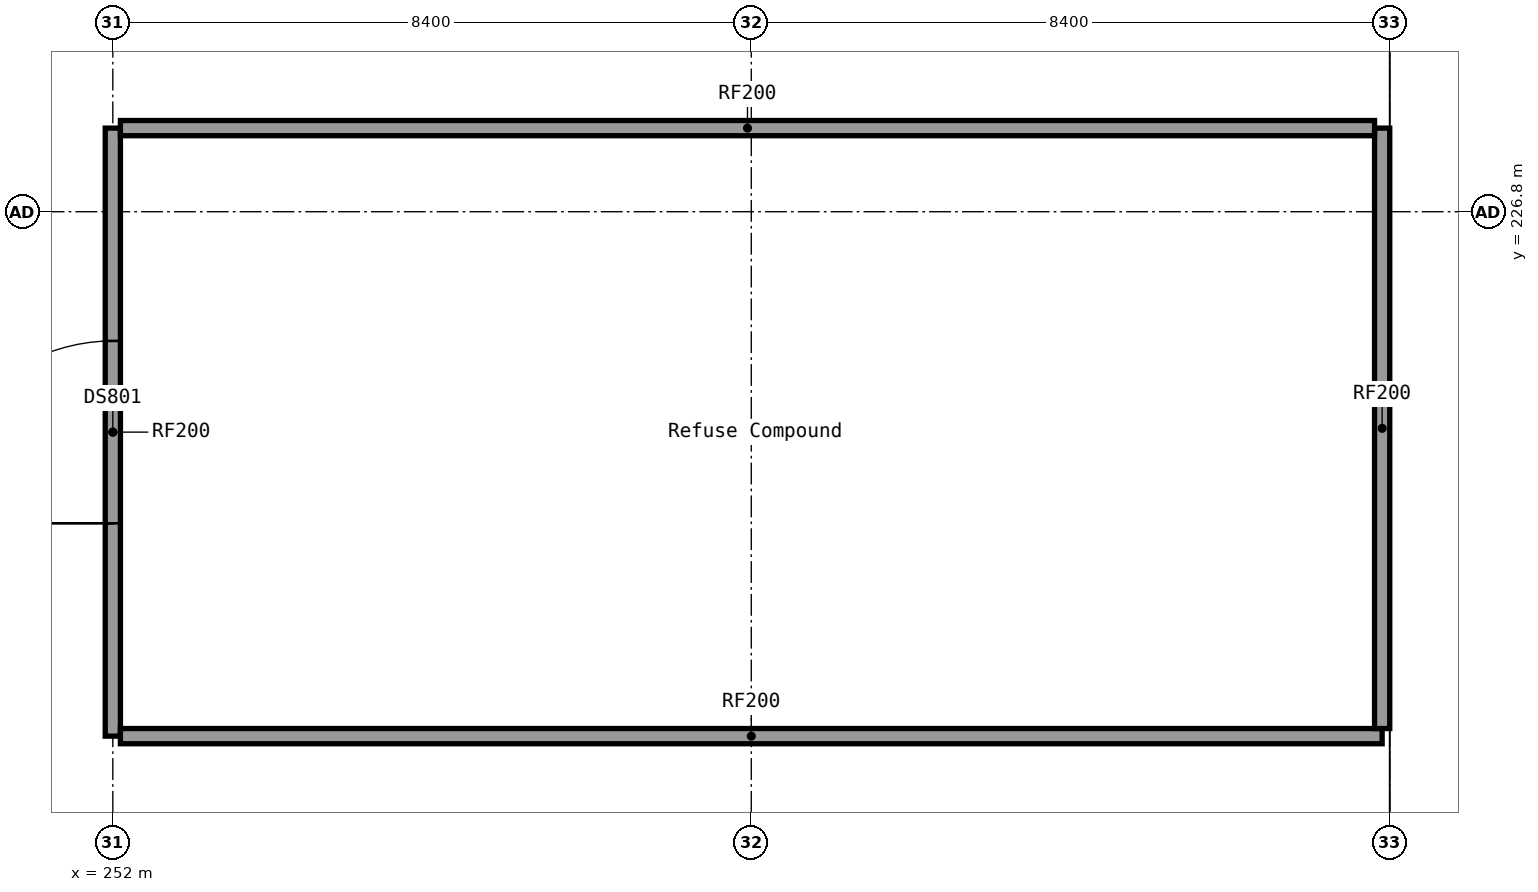
"""IFC4 building model, lengths in metres.
Left out: names, types, materials, properties, quantities, classifications, styles, units other than length and angle.
Written with IfcOpenShell. Run it as: python <this file> out.ifc"""

import sys

from ifc_helpers import new_model, si_unit, direction, frame, frame_2d, origin, place, context, subcontext, project, spatial, rectangle, extrude, element, fill, save


model = new_model("IFC4")
c1 = context("Model", 3, precision=1e-05, world=origin(), true_north=direction((0.0, 1.0)))
c2 = subcontext(c1, "Body", "Model", "MODEL_VIEW")
j1 = project(units=[si_unit("LENGTHUNIT", "METRE"), si_unit("PLANEANGLEUNIT", "RADIAN")], contexts=[c1])
p1 = place(None, origin())
s1 = spatial("IfcSite", under=j1, at=p1, CompositionType="ELEMENT")
p2 = place(p1, origin())
s2 = spatial("IfcBuilding", under=s1, at=p2, CompositionType="ELEMENT")
p3 = place(p2, origin())
s3 = spatial("IfcBuildingStorey", under=s2, at=p3, CompositionType="ELEMENT", Elevation=0.0)
p4 = place(p3, frame((252.0, 219.9, 0.0), z_axis=(0.0, 0.0, 1.0), x_axis=(0.0, 1.0, 0.0)))
e1 = element("IfcWall", 1, at=p4, inside=s3, PredefinedType="SOLIDWALL", context=c2, shape_type="SweptSolid", body=[
    extrude(rectangle(XDim=8.0, YDim=0.2, at=frame_2d((4.0, 0.0))), origin(), (0.0, 0.0, 1.0), 2.4),
])
p5 = place(p4, frame((2.8, 0.0, 0.0)))
e2 = element("IfcOpeningElement", 2, at=p5, cuts=e1, PredefinedType="OPENING", context=c2, shape_type="SweptSolid", body=[
    extrude(rectangle(XDim=2.4, YDim=2.4, at=frame_2d((1.2, 1.2))), frame((0.0, 0.1, 0.0), z_axis=(0.0, -1.0, 0.0), x_axis=(1.0, 0.0, 0.0)), (0.0, 0.0, 1.0), 0.2),
])
p6 = place(p3, frame((252.1, 219.9, 0.0), z_axis=(0.0, 0.0, 1.0), x_axis=(1.0, 0.0, 0.0)))
e3 = element("IfcWall", 3, at=p6, inside=s3, PredefinedType="SOLIDWALL", context=c2, shape_type="SweptSolid", body=[
    extrude(rectangle(XDim=16.6, YDim=0.2, at=frame_2d((8.3, 0.0))), origin(), (0.0, 0.0, 1.0), 2.4),
])
p7 = place(p3, frame((268.7, 220.0, 0.0), z_axis=(0.0, 0.0, 1.0), x_axis=(0.0, 1.0, 0.0)))
e4 = element("IfcWall", 4, at=p7, inside=s3, PredefinedType="SOLIDWALL", context=c2, shape_type="SweptSolid", body=[
    extrude(rectangle(XDim=7.9, YDim=0.2, at=frame_2d((3.95, 0.0))), origin(), (0.0, 0.0, 1.0), 2.4),
])
p8 = place(p3, frame((252.1, 227.9, 0.0), z_axis=(0.0, 0.0, 1.0), x_axis=(1.0, 0.0, 0.0)))
e5 = element("IfcWall", 5, at=p8, inside=s3, PredefinedType="SOLIDWALL", context=c2, shape_type="SweptSolid", body=[
    extrude(rectangle(XDim=16.5, YDim=0.2, at=frame_2d((8.25, 0.0))), origin(), (0.0, 0.0, 1.0), 2.4),
])
p9 = place(p5, origin())
e6 = element("IfcDoor", 6, at=p9, inside=s3, OperationType="DOUBLE_DOOR_DOUBLE_SWING", PredefinedType="DOOR", context=c2, shape_type="SweptSolid", body=[
    extrude(rectangle(XDim=2.4, YDim=2.4, at=frame_2d((1.2, 1.2))), frame((0.0, 0.025, 0.0), z_axis=(0.0, -1.0, 0.0), x_axis=(1.0, 0.0, 0.0)), (0.0, 0.0, 1.0), 0.05),
])
fill(e2, e6)
save(model, sys.argv[1])
